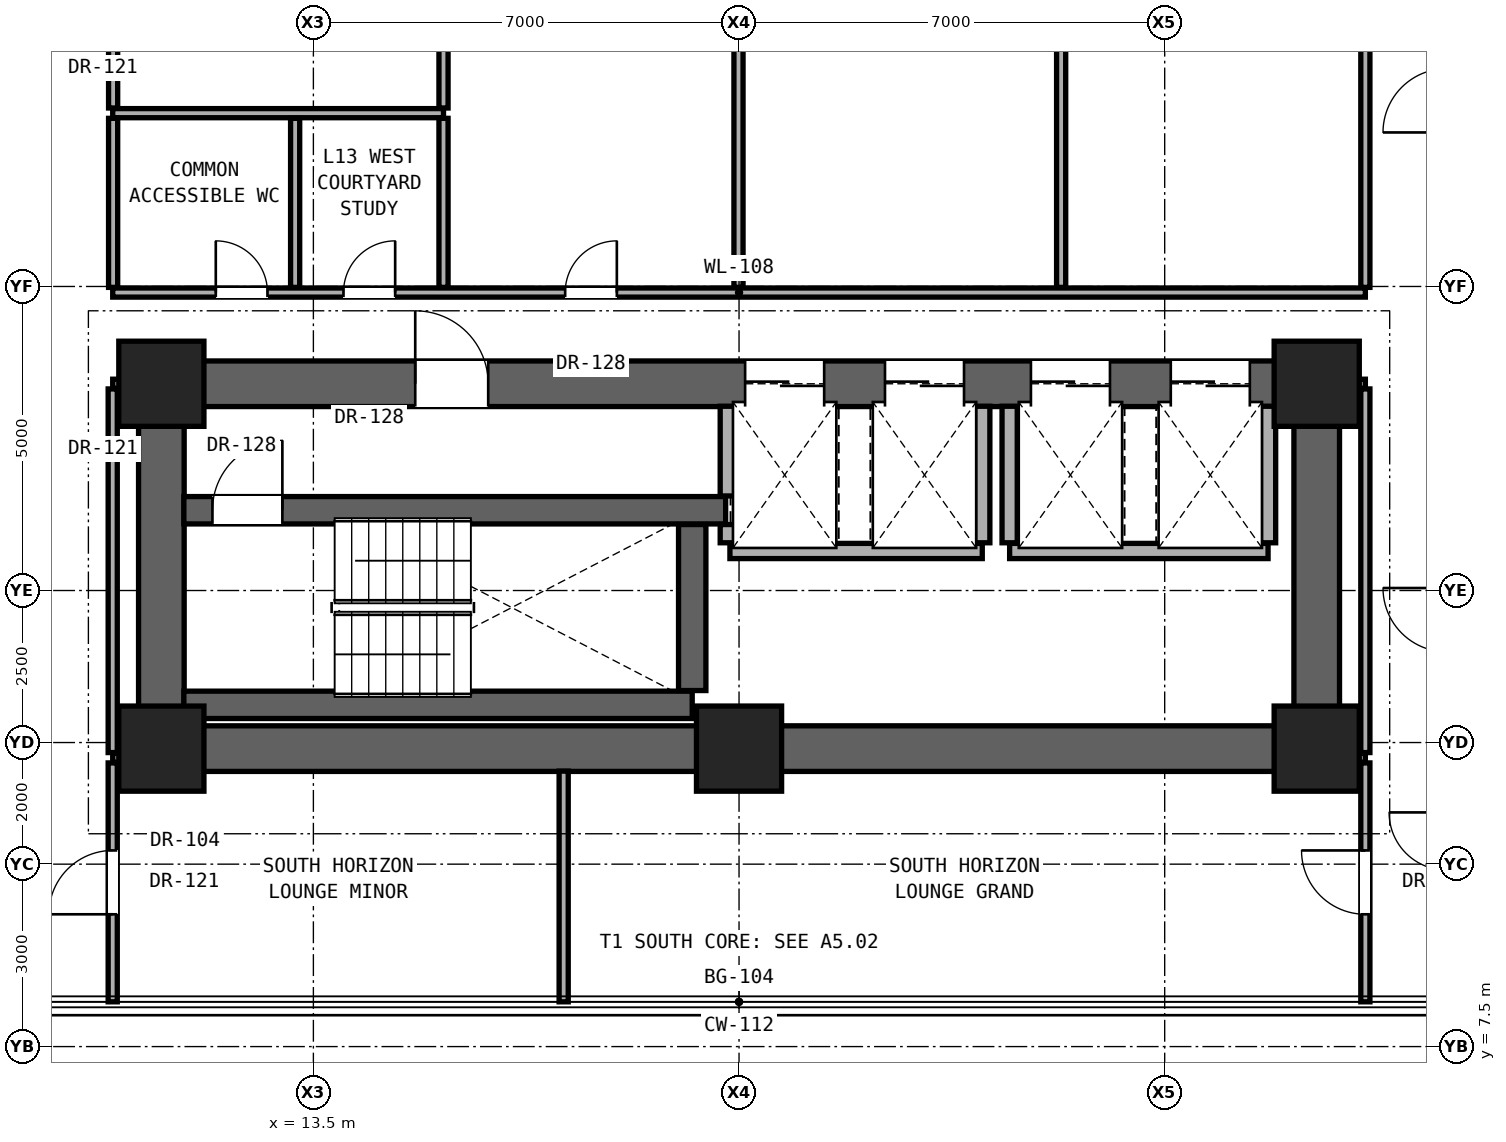
"""IFC4 building model, lengths in metres.
Left out: names, types, materials, properties, quantities, classifications, styles, units other than length and angle.
Written with IfcOpenShell. Run it as: python <this file> out.ifc"""

import sys

from ifc_helpers import new_model, si_unit, direction, frame, frame_2d, origin, origin_2d, place, context, subcontext, project, spatial, rectangle, extrude, element, fill, save


model = new_model("IFC4")
c1 = context("Model", 3, precision=1e-05, world=origin(), true_north=direction((0.0, 1.0)))
c2 = subcontext(c1, "Body", "Model", "MODEL_VIEW")
j1 = project(units=[si_unit("LENGTHUNIT", "METRE"), si_unit("PLANEANGLEUNIT", "RADIAN")], contexts=[c1])
p1 = place(None, origin())
s1 = spatial("IfcSite", under=j1, at=p1, CompositionType="ELEMENT")
p2 = place(p1, origin())
s2 = spatial("IfcBuilding", under=s1, at=p2, CompositionType="ELEMENT")
p3 = place(p2, frame((0.0, 0.0, 48.8)))
s3 = spatial("IfcBuildingStorey", under=s2, at=p3, CompositionType="ELEMENT", Elevation=48.8)
for number, where, z_axis, x_axis in (
    (1, (11.0, 12.4, 0.0), (0.0, 0.0, 1.0), (1.0, 0.0, 0.0)),
    (2, (20.5, 12.4, 0.0), (0.0, 0.0, 1.0), (1.0, 0.0, 0.0)),
    (3, (30.0, 12.4, 0.0), (0.0, 0.0, 1.0), (1.0, 0.0, 0.0)),
    (4, (11.0, 18.4, 0.0), (0.0, 0.0, 1.0), (1.0, 0.0, 0.0)),
    (5, (30.0, 18.4, 0.0), (0.0, 0.0, 1.0), (1.0, 0.0, 0.0)),
):
    element("IfcColumn", number, at=place(p3, frame(where, z_axis=z_axis, x_axis=x_axis)), inside=s3, PredefinedType="COLUMN", context=c2, shape_type="SweptSolid", body=[
        extrude(rectangle(XDim=1.4, YDim=1.4, at=origin_2d()), origin(), (0.0, 0.0, 1.0), 3.3),
    ])
p4 = place(p3, frame((11.0, 12.4, 0.0), z_axis=(0.0, 0.0, 1.0), x_axis=(1.0, 0.0, 0.0)))
e6 = element("IfcWall", 6, at=p4, inside=s3, PredefinedType="SHEAR", context=c2, shape_type="SweptSolid", body=[
    extrude(rectangle(XDim=19.0, YDim=0.75, at=frame_2d((9.5, 0.0))), origin(), (0.0, 0.0, 1.0), 3.06),
])
for number, where, z_axis, x_axis in (
    (7, (11.0, 12.4, 0.0), (0.0, 0.0, 1.0), (0.0, 1.0, 0.0)),
    (8, (30.0, 12.4, 0.0), (0.0, 0.0, 1.0), (0.0, 1.0, 0.0)),
):
    element("IfcWall", number, at=place(p3, frame(where, z_axis=z_axis, x_axis=x_axis)), inside=s3, PredefinedType="SHEAR", context=c2, shape_type="SweptSolid", body=[
        extrude(rectangle(XDim=6.0, YDim=0.75, at=frame_2d((3.0, 0.0))), origin(), (0.0, 0.0, 1.0), 3.06),
    ])
p5 = place(p3, frame((11.0, 18.4, 0.0), z_axis=(0.0, 0.0, 1.0), x_axis=(1.0, 0.0, 0.0)))
e9 = element("IfcWall", 9, at=p5, inside=s3, PredefinedType="SHEAR", context=c2, shape_type="SweptSolid", body=[
    extrude(rectangle(XDim=19.0, YDim=0.75, at=frame_2d((9.5, 0.0))), origin(), (0.0, 0.0, 1.0), 3.06),
])
p6 = place(p5, frame((4.175, 0.0, 0.0)))
e10 = element("IfcOpeningElement", 10, at=p6, cuts=e9, PredefinedType="OPENING", context=c2, shape_type="SweptSolid", body=[
    extrude(rectangle(XDim=1.2, YDim=2.25, at=frame_2d((0.6, 1.125))), frame((0.0, 0.385, 0.0), z_axis=(0.0, -1.0, 0.0), x_axis=(1.0, 0.0, 0.0)), (0.0, 0.0, 1.0), 0.77),
])
p7 = place(p5, frame((9.6, 0.0, 0.0)))
e11 = element("IfcOpeningElement", 11, at=p7, cuts=e9, PredefinedType="OPENING", context=c2, shape_type="SweptSolid", body=[
    extrude(rectangle(XDim=1.3, YDim=2.3, at=frame_2d((0.65, 1.15))), frame((0.0, 0.385, 0.0), z_axis=(0.0, -1.0, 0.0), x_axis=(1.0, 0.0, 0.0)), (0.0, 0.0, 1.0), 0.77),
])
p8 = place(p5, frame((11.9, 0.0, 0.0)))
e12 = element("IfcOpeningElement", 12, at=p8, cuts=e9, PredefinedType="OPENING", context=c2, shape_type="SweptSolid", body=[
    extrude(rectangle(XDim=1.3, YDim=2.3, at=frame_2d((0.65, 1.15))), frame((0.0, 0.385, 0.0), z_axis=(0.0, -1.0, 0.0), x_axis=(1.0, 0.0, 0.0)), (0.0, 0.0, 1.0), 0.77),
])
p9 = place(p5, frame((14.3, 0.0, 0.0)))
e13 = element("IfcOpeningElement", 13, at=p9, cuts=e9, PredefinedType="OPENING", context=c2, shape_type="SweptSolid", body=[
    extrude(rectangle(XDim=1.3, YDim=2.3, at=frame_2d((0.65, 1.15))), frame((0.0, 0.385, 0.0), z_axis=(0.0, -1.0, 0.0), x_axis=(1.0, 0.0, 0.0)), (0.0, 0.0, 1.0), 0.77),
])
p10 = place(p5, frame((16.6, 0.0, 0.0)))
e14 = element("IfcOpeningElement", 14, at=p10, cuts=e9, PredefinedType="OPENING", context=c2, shape_type="SweptSolid", body=[
    extrude(rectangle(XDim=1.3, YDim=2.3, at=frame_2d((0.65, 1.15))), frame((0.0, 0.385, 0.0), z_axis=(0.0, -1.0, 0.0), x_axis=(1.0, 0.0, 0.0)), (0.0, 0.0, 1.0), 0.77),
])
for number, where, z_axis, x_axis in (
    (15, (10.2, 12.25, 0.0), (0.0, 0.0, 1.0), (1.0, 0.0, 0.0)),
    (16, (30.37, 12.25, 0.0), (0.0, 0.0, 1.0), (1.0, 0.0, 0.0)),
):
    element("IfcWall", number, at=place(p3, frame(where, z_axis=z_axis, x_axis=x_axis)), inside=s3, PredefinedType="PARTITIONING", context=c2, shape_type="SweptSolid", body=[
        extrude(rectangle(XDim=0.43, YDim=0.15, at=frame_2d((0.215, 0.0))), origin(), (0.0, 0.0, 1.0), 3.06),
    ])
p11 = place(p3, frame((11.37, 13.12, 0.0), z_axis=(0.0, 0.0, 1.0), x_axis=(1.0, 0.0, 0.0)))
e17 = element("IfcWall", 17, at=p11, inside=s3, PredefinedType="SHEAR", context=c2, shape_type="SweptSolid", body=[
    extrude(rectangle(XDim=8.36, YDim=0.45, at=frame_2d((4.18, 0.0))), origin(), (0.0, 0.0, 1.0), 3.06),
])
p12 = place(p3, frame((20.35, 15.65, 0.0), z_axis=(0.0, 0.0, 1.0), x_axis=(1.0, 0.0, 0.0)))
e18 = element("IfcWall", 18, at=p12, inside=s3, PredefinedType="SOLIDWALL", context=c2, shape_type="SweptSolid", body=[
    extrude(rectangle(XDim=4.15, YDim=0.25, at=frame_2d((2.075, 0.0))), origin(), (0.0, 0.0, 1.0), 3.06),
])
p13 = place(p3, frame((24.95, 15.65, 0.0), z_axis=(0.0, 0.0, 1.0), x_axis=(1.0, 0.0, 0.0)))
e19 = element("IfcWall", 19, at=p13, inside=s3, PredefinedType="SOLIDWALL", context=c2, shape_type="SweptSolid", body=[
    extrude(rectangle(XDim=4.25, YDim=0.25, at=frame_2d((2.125, 0.0))), origin(), (0.0, 0.0, 1.0), 3.06),
])
p14 = place(p3, frame((11.37, 16.32, 0.0), z_axis=(0.0, 0.0, 1.0), x_axis=(1.0, 0.0, 0.0)))
e20 = element("IfcWall", 20, at=p14, inside=s3, PredefinedType="SHEAR", context=c2, shape_type="SweptSolid", body=[
    extrude(rectangle(XDim=8.91, YDim=0.45, at=frame_2d((4.455, 0.0))), origin(), (0.0, 0.0, 1.0), 3.06),
])
p15 = place(p14, frame((0.47, 0.0, 0.0)))
e21 = element("IfcOpeningElement", 21, at=p15, cuts=e20, PredefinedType="OPENING", context=c2, shape_type="SweptSolid", body=[
    extrude(rectangle(XDim=1.15, YDim=2.2, at=frame_2d((0.575, 1.1))), frame((0.0, 0.235, 0.0), z_axis=(0.0, -1.0, 0.0), x_axis=(1.0, 0.0, 0.0)), (0.0, 0.0, 1.0), 0.47),
])
for number, where, z_axis, x_axis in (
    (22, (10.2, 18.4, 0.0), (0.0, 0.0, 1.0), (1.0, 0.0, 0.0)),
    (23, (30.37, 18.4, 0.0), (0.0, 0.0, 1.0), (1.0, 0.0, 0.0)),
):
    element("IfcWall", number, at=place(p3, frame(where, z_axis=z_axis, x_axis=x_axis)), inside=s3, PredefinedType="PARTITIONING", context=c2, shape_type="SweptSolid", body=[
        extrude(rectangle(XDim=0.43, YDim=0.15, at=frame_2d((0.215, 0.0))), origin(), (0.0, 0.0, 1.0), 2.436),
    ])
p16 = place(p3, frame((10.2, 19.9, 0.0), z_axis=(0.0, 0.0, 1.0), x_axis=(1.0, 0.0, 0.0)))
e24 = element("IfcWall", 24, at=p16, inside=s3, PredefinedType="PARTITIONING", context=c2, shape_type="SweptSolid", body=[
    extrude(rectangle(XDim=20.6, YDim=0.15, at=frame_2d((10.3, 0.0))), origin(), (0.0, 0.0, 1.0), 2.104),
])
p17 = place(p16, frame((1.695, 0.0, 0.0)))
e25 = element("IfcOpeningElement", 25, at=p17, cuts=e24, PredefinedType="OPENING", context=c2, shape_type="SweptSolid", body=[
    extrude(rectangle(XDim=0.85, YDim=2.01, at=frame_2d((0.425, 1.005))), frame((0.0, 0.085, 0.0), z_axis=(0.0, -1.0, 0.0), x_axis=(1.0, 0.0, 0.0)), (0.0, 0.0, 1.0), 0.17),
])
p18 = place(p16, frame((3.795, 0.0, 0.0)))
e26 = element("IfcOpeningElement", 26, at=p18, cuts=e24, PredefinedType="OPENING", context=c2, shape_type="SweptSolid", body=[
    extrude(rectangle(XDim=0.85, YDim=2.01, at=frame_2d((0.425, 1.005))), frame((0.0, 0.085, 0.0), z_axis=(0.0, -1.0, 0.0), x_axis=(1.0, 0.0, 0.0)), (0.0, 0.0, 1.0), 0.17),
])
p19 = place(p16, frame((7.44, 0.0, 0.0)))
e27 = element("IfcOpeningElement", 27, at=p19, cuts=e24, PredefinedType="OPENING", context=c2, shape_type="SweptSolid", body=[
    extrude(rectangle(XDim=0.85, YDim=2.01, at=frame_2d((0.425, 1.005))), frame((0.0, 0.085, 0.0), z_axis=(0.0, -1.0, 0.0), x_axis=(1.0, 0.0, 0.0)), (0.0, 0.0, 1.0), 0.17),
])
p20 = place(p3, frame((10.2, 22.85, 0.0), z_axis=(0.0, 0.0, 1.0), x_axis=(1.0, 0.0, 0.0)))
e28 = element("IfcWall", 28, at=p20, inside=s3, PredefinedType="PARTITIONING", context=c2, shape_type="SweptSolid", body=[
    extrude(rectangle(XDim=5.44, YDim=0.15, at=frame_2d((2.72, 0.0))), origin(), (0.0, 0.0, 1.0), 2.104),
])
p21 = place(p3, frame((10.2, 8.236, 0.0), z_axis=(0.0, 0.0, 1.0), x_axis=(0.0, 1.0, 0.0)))
e29 = element("IfcWall", 29, at=p21, inside=s3, PredefinedType="PARTITIONING", context=c2, shape_type="SweptSolid", body=[
    extrude(rectangle(XDim=3.929, YDim=0.15, at=frame_2d((1.964, 0.0))), origin(), (0.0, 0.0, 1.0), 3.06),
])
p22 = place(p21, frame((1.439, 0.0, 0.0)))
e30 = element("IfcOpeningElement", 30, at=p22, cuts=e29, PredefinedType="OPENING", context=c2, shape_type="SweptSolid", body=[
    extrude(rectangle(XDim=1.05, YDim=2.2, at=frame_2d((0.525, 1.1))), frame((0.0, 0.085, 0.0), z_axis=(0.0, -1.0, 0.0), x_axis=(1.0, 0.0, 0.0)), (0.0, 0.0, 1.0), 0.17),
])
p23 = place(p3, frame((10.2, 12.335, 0.0), z_axis=(0.0, 0.0, 1.0), x_axis=(0.0, 1.0, 0.0)))
e31 = element("IfcWall", 31, at=p23, inside=s3, PredefinedType="PARTITIONING", context=c2, shape_type="SweptSolid", body=[
    extrude(rectangle(XDim=5.98, YDim=0.15, at=frame_2d((2.99, 0.0))), origin(), (0.0, 0.0, 1.0), 2.436),
])
p24 = place(p3, frame((10.207, 19.985, 0.0), z_axis=(0.0, 0.0, 1.0), x_axis=(0.0, 1.0, 0.0)))
e32 = element("IfcWall", 32, at=p24, inside=s3, PredefinedType="PARTITIONING", context=c2, shape_type="SweptSolid", body=[
    extrude(rectangle(XDim=2.78, YDim=0.15, at=frame_2d((1.39, 0.0))), origin(), (0.0, 0.0, 1.0), 3.06),
])
p25 = place(p3, frame((10.207, 22.935, 0.0), z_axis=(0.0, 0.0, 1.0), x_axis=(0.0, 1.0, 0.0)))
e33 = element("IfcWall", 33, at=p25, inside=s3, PredefinedType="PARTITIONING", context=c2, shape_type="SweptSolid", body=[
    extrude(rectangle(XDim=10.08, YDim=0.15, at=frame_2d((5.04, 0.0))), origin(), (0.0, 0.0, 1.0), 2.279),
])
p26 = place(p25, frame((4.565, 0.0, 0.0)))
e34 = element("IfcOpeningElement", 34, at=p26, cuts=e33, PredefinedType="OPENING", context=c2, shape_type="SweptSolid", body=[
    extrude(rectangle(XDim=0.95, YDim=2.15, at=frame_2d((0.475, 1.075))), frame((0.0, 0.085, 0.0), z_axis=(0.0, -1.0, 0.0), x_axis=(1.0, 0.0, 0.0)), (0.0, 0.0, 1.0), 0.17),
])
p27 = place(p3, frame((13.2, 19.985, 0.0), z_axis=(0.0, 0.0, 1.0), x_axis=(0.0, 1.0, 0.0)))
e35 = element("IfcWall", 35, at=p27, inside=s3, PredefinedType="PARTITIONING", context=c2, shape_type="SweptSolid", body=[
    extrude(rectangle(XDim=2.78, YDim=0.15, at=frame_2d((1.39, 0.0))), origin(), (0.0, 0.0, 1.0), 3.06),
])
p28 = place(p3, frame((15.64, 19.985, 0.0), z_axis=(0.0, 0.0, 1.0), x_axis=(0.0, 1.0, 0.0)))
e36 = element("IfcWall", 36, at=p28, inside=s3, PredefinedType="PARTITIONING", context=c2, shape_type="SweptSolid", body=[
    extrude(rectangle(XDim=2.78, YDim=0.15, at=frame_2d((1.39, 0.0))), origin(), (0.0, 0.0, 1.0), 2.589),
])
p29 = place(p3, frame((15.64, 22.935, 0.0), z_axis=(0.0, 0.0, 1.0), x_axis=(0.0, 1.0, 0.0)))
e37 = element("IfcWall", 37, at=p29, inside=s3, PredefinedType="PARTITIONING", context=c2, shape_type="SweptSolid", body=[
    extrude(rectangle(XDim=10.08, YDim=0.15, at=frame_2d((5.04, 0.0))), origin(), (0.0, 0.0, 1.0), 2.104),
])
p30 = place(p3, frame((17.616, 8.236, 0.0), z_axis=(0.0, 0.0, 1.0), x_axis=(0.0, 1.0, 0.0)))
e38 = element("IfcWall", 38, at=p30, inside=s3, PredefinedType="PARTITIONING", context=c2, shape_type="SweptSolid", body=[
    extrude(rectangle(XDim=3.794, YDim=0.15, at=frame_2d((1.897, 0.0))), origin(), (0.0, 0.0, 1.0), 3.06),
])
p31 = place(p3, frame((19.73, 13.355, 0.0), z_axis=(0.0, 0.0, 1.0), x_axis=(0.0, 1.0, 0.0)))
e39 = element("IfcWall", 39, at=p31, inside=s3, PredefinedType="SHEAR", context=c2, shape_type="SweptSolid", body=[
    extrude(rectangle(XDim=2.73, YDim=0.45, at=frame_2d((1.365, 0.0))), origin(), (0.0, 0.0, 1.0), 3.06),
])
p32 = place(p3, frame((20.315, 15.785, 0.0), z_axis=(0.0, 0.0, 1.0), x_axis=(0.0, 1.0, 0.0)))
e40 = element("IfcWall", 40, at=p32, inside=s3, PredefinedType="SOLIDWALL", context=c2, shape_type="SweptSolid", body=[
    extrude(rectangle(XDim=0.3, YDim=0.25, at=frame_2d((0.15, 0.0))), origin(), (0.0, 0.0, 1.0), 3.06),
])
p33 = place(p3, frame((20.315, 16.555, 0.0), z_axis=(0.0, 0.0, 1.0), x_axis=(0.0, 1.0, 0.0)))
e41 = element("IfcWall", 41, at=p33, inside=s3, PredefinedType="SOLIDWALL", context=c2, shape_type="SweptSolid", body=[
    extrude(rectangle(XDim=1.475, YDim=0.25, at=frame_2d((0.738, 0.0))), origin(), (0.0, 0.0, 1.0), 3.06),
])
p34 = place(p3, frame((20.491, 19.985, 0.0), z_axis=(0.0, 0.0, 1.0), x_axis=(0.0, 1.0, 0.0)))
e42 = element("IfcWall", 42, at=p34, inside=s3, PredefinedType="PARTITIONING", context=c2, shape_type="SweptSolid", body=[
    extrude(rectangle(XDim=13.03, YDim=0.15, at=frame_2d((6.515, 0.0))), origin(), (0.0, 0.0, 1.0), 2.104),
])
for number, where, z_axis, x_axis in (
    (43, (24.5, 15.785, 0.0), (0.0, 0.0, 1.0), (0.0, 1.0, 0.0)),
    (44, (24.95, 15.785, 0.0), (0.0, 0.0, 1.0), (0.0, 1.0, 0.0)),
):
    element("IfcWall", number, at=place(p3, frame(where, z_axis=z_axis, x_axis=x_axis)), inside=s3, PredefinedType="SOLIDWALL", context=c2, shape_type="SweptSolid", body=[
        extrude(rectangle(XDim=2.245, YDim=0.25, at=frame_2d((1.123, 0.0))), origin(), (0.0, 0.0, 1.0), 3.06),
    ])
p35 = place(p3, frame((25.797, 19.985, 0.0), z_axis=(0.0, 0.0, 1.0), x_axis=(0.0, 1.0, 0.0)))
e45 = element("IfcWall", 45, at=p35, inside=s3, PredefinedType="PARTITIONING", context=c2, shape_type="SweptSolid", body=[
    extrude(rectangle(XDim=13.03, YDim=0.15, at=frame_2d((6.515, 0.0))), origin(), (0.0, 0.0, 1.0), 2.104),
])
p36 = place(p3, frame((29.2, 15.785, 0.0), z_axis=(0.0, 0.0, 1.0), x_axis=(0.0, 1.0, 0.0)))
e46 = element("IfcWall", 46, at=p36, inside=s3, PredefinedType="SOLIDWALL", context=c2, shape_type="SweptSolid", body=[
    extrude(rectangle(XDim=2.245, YDim=0.25, at=frame_2d((1.123, 0.0))), origin(), (0.0, 0.0, 1.0), 3.06),
])
p37 = place(p3, frame((30.8, 8.236, 0.0), z_axis=(0.0, 0.0, 1.0), x_axis=(0.0, 1.0, 0.0)))
e47 = element("IfcWall", 47, at=p37, inside=s3, PredefinedType="PARTITIONING", context=c2, shape_type="SweptSolid", body=[
    extrude(rectangle(XDim=3.929, YDim=0.15, at=frame_2d((1.964, 0.0))), origin(), (0.0, 0.0, 1.0), 3.06),
])
p38 = place(p37, frame((1.439, 0.0, 0.0)))
e48 = element("IfcOpeningElement", 48, at=p38, cuts=e47, PredefinedType="OPENING", context=c2, shape_type="SweptSolid", body=[
    extrude(rectangle(XDim=1.05, YDim=2.2, at=frame_2d((0.525, 1.1))), frame((0.0, 0.085, 0.0), z_axis=(0.0, -1.0, 0.0), x_axis=(1.0, 0.0, 0.0)), (0.0, 0.0, 1.0), 0.17),
])
p39 = place(p3, frame((30.8, 12.335, 0.0), z_axis=(0.0, 0.0, 1.0), x_axis=(0.0, 1.0, 0.0)))
e49 = element("IfcWall", 49, at=p39, inside=s3, PredefinedType="PARTITIONING", context=c2, shape_type="SweptSolid", body=[
    extrude(rectangle(XDim=5.98, YDim=0.15, at=frame_2d((2.99, 0.0))), origin(), (0.0, 0.0, 1.0), 2.436),
])
p40 = place(p3, frame((30.8, 19.985, 0.0), z_axis=(0.0, 0.0, 1.0), x_axis=(0.0, 1.0, 0.0)))
e50 = element("IfcWall", 50, at=p40, inside=s3, PredefinedType="PARTITIONING", context=c2, shape_type="SweptSolid", body=[
    extrude(rectangle(XDim=13.03, YDim=0.15, at=frame_2d((6.515, 0.0))), origin(), (0.0, 0.0, 1.0), 2.279),
])
p41 = place(p6, origin())
e51 = element("IfcDoor", 51, at=p41, inside=s3, OperationType="SINGLE_SWING_LEFT", PredefinedType="DOOR", context=c2, shape_type="SweptSolid", body=[
    extrude(rectangle(XDim=1.2, YDim=2.25, at=frame_2d((0.6, 1.125))), frame((0.0, 0.025, 0.0), z_axis=(0.0, -1.0, 0.0), x_axis=(1.0, 0.0, 0.0)), (0.0, 0.0, 1.0), 0.05),
])
fill(e10, e51)
p42 = place(p15, origin())
e52 = element("IfcDoor", 52, at=p42, inside=s3, OperationType="SINGLE_SWING_RIGHT", PredefinedType="DOOR", context=c2, shape_type="SweptSolid", body=[
    extrude(rectangle(XDim=1.15, YDim=2.2, at=frame_2d((0.575, 1.1))), frame((0.0, 0.025, 0.0), z_axis=(0.0, -1.0, 0.0), x_axis=(1.0, 0.0, 0.0)), (0.0, 0.0, 1.0), 0.05),
])
fill(e21, e52)
p43 = place(p17, origin())
e53 = element("IfcDoor", 53, at=p43, inside=s3, OperationType="SINGLE_SWING_LEFT", PredefinedType="DOOR", context=c2, shape_type="SweptSolid", body=[
    extrude(rectangle(XDim=0.85, YDim=2.01, at=frame_2d((0.425, 1.005))), frame((0.0, 0.025, 0.0), z_axis=(0.0, -1.0, 0.0), x_axis=(1.0, 0.0, 0.0)), (0.0, 0.0, 1.0), 0.05),
])
fill(e25, e53)
p44 = place(p18, origin())
e54 = element("IfcDoor", 54, at=p44, inside=s3, OperationType="SINGLE_SWING_RIGHT", PredefinedType="DOOR", context=c2, shape_type="SweptSolid", body=[
    extrude(rectangle(XDim=0.85, YDim=2.01, at=frame_2d((0.425, 1.005))), frame((0.0, 0.025, 0.0), z_axis=(0.0, -1.0, 0.0), x_axis=(1.0, 0.0, 0.0)), (0.0, 0.0, 1.0), 0.05),
])
fill(e26, e54)
p45 = place(p19, origin())
e55 = element("IfcDoor", 55, at=p45, inside=s3, OperationType="SINGLE_SWING_RIGHT", PredefinedType="DOOR", context=c2, shape_type="SweptSolid", body=[
    extrude(rectangle(XDim=0.85, YDim=2.01, at=frame_2d((0.425, 1.005))), frame((0.0, 0.025, 0.0), z_axis=(0.0, -1.0, 0.0), x_axis=(1.0, 0.0, 0.0)), (0.0, 0.0, 1.0), 0.05),
])
fill(e27, e55)
p46 = place(p22, origin())
e56 = element("IfcDoor", 56, at=p46, inside=s3, OperationType="SINGLE_SWING_LEFT", PredefinedType="DOOR", context=c2, shape_type="SweptSolid", body=[
    extrude(rectangle(XDim=1.05, YDim=2.2, at=frame_2d((0.525, 1.1))), frame((0.0, 0.025, 0.0), z_axis=(0.0, -1.0, 0.0), x_axis=(1.0, 0.0, 0.0)), (0.0, 0.0, 1.0), 0.05),
])
fill(e30, e56)
p47 = place(p38, origin())
e57 = element("IfcDoor", 57, at=p47, inside=s3, OperationType="SINGLE_SWING_RIGHT", PredefinedType="DOOR", context=c2, shape_type="SweptSolid", body=[
    extrude(rectangle(XDim=1.05, YDim=2.2, at=frame_2d((0.525, 1.1))), frame((0.0, 0.025, 0.0), z_axis=(0.0, -1.0, 0.0), x_axis=(1.0, 0.0, 0.0)), (0.0, 0.0, 1.0), 0.05),
])
fill(e48, e57)
p48 = place(p7, origin())
e58 = element("IfcDoor", 58, at=p48, inside=s3, OperationType="DOUBLE_DOOR_SLIDING", PredefinedType="DOOR", context=c2, shape_type="SweptSolid", body=[
    extrude(rectangle(XDim=1.3, YDim=2.3, at=frame_2d((0.65, 1.15))), frame((0.0, 0.025, 0.0), z_axis=(0.0, -1.0, 0.0), x_axis=(1.0, 0.0, 0.0)), (0.0, 0.0, 1.0), 0.05),
])
fill(e11, e58)
p49 = place(p8, origin())
e59 = element("IfcDoor", 59, at=p49, inside=s3, OperationType="DOUBLE_DOOR_SLIDING", PredefinedType="DOOR", context=c2, shape_type="SweptSolid", body=[
    extrude(rectangle(XDim=1.3, YDim=2.3, at=frame_2d((0.65, 1.15))), frame((0.0, 0.025, 0.0), z_axis=(0.0, -1.0, 0.0), x_axis=(1.0, 0.0, 0.0)), (0.0, 0.0, 1.0), 0.05),
])
fill(e12, e59)
p50 = place(p9, origin())
e60 = element("IfcDoor", 60, at=p50, inside=s3, OperationType="DOUBLE_DOOR_SLIDING", PredefinedType="DOOR", context=c2, shape_type="SweptSolid", body=[
    extrude(rectangle(XDim=1.3, YDim=2.3, at=frame_2d((0.65, 1.15))), frame((0.0, 0.025, 0.0), z_axis=(0.0, -1.0, 0.0), x_axis=(1.0, 0.0, 0.0)), (0.0, 0.0, 1.0), 0.05),
])
fill(e13, e60)
p51 = place(p10, origin())
e61 = element("IfcDoor", 61, at=p51, inside=s3, OperationType="DOUBLE_DOOR_SLIDING", PredefinedType="DOOR", context=c2, shape_type="SweptSolid", body=[
    extrude(rectangle(XDim=1.3, YDim=2.3, at=frame_2d((0.65, 1.15))), frame((0.0, 0.025, 0.0), z_axis=(0.0, -1.0, 0.0), x_axis=(1.0, 0.0, 0.0)), (0.0, 0.0, 1.0), 0.05),
])
fill(e14, e61)
save(model, sys.argv[1])
